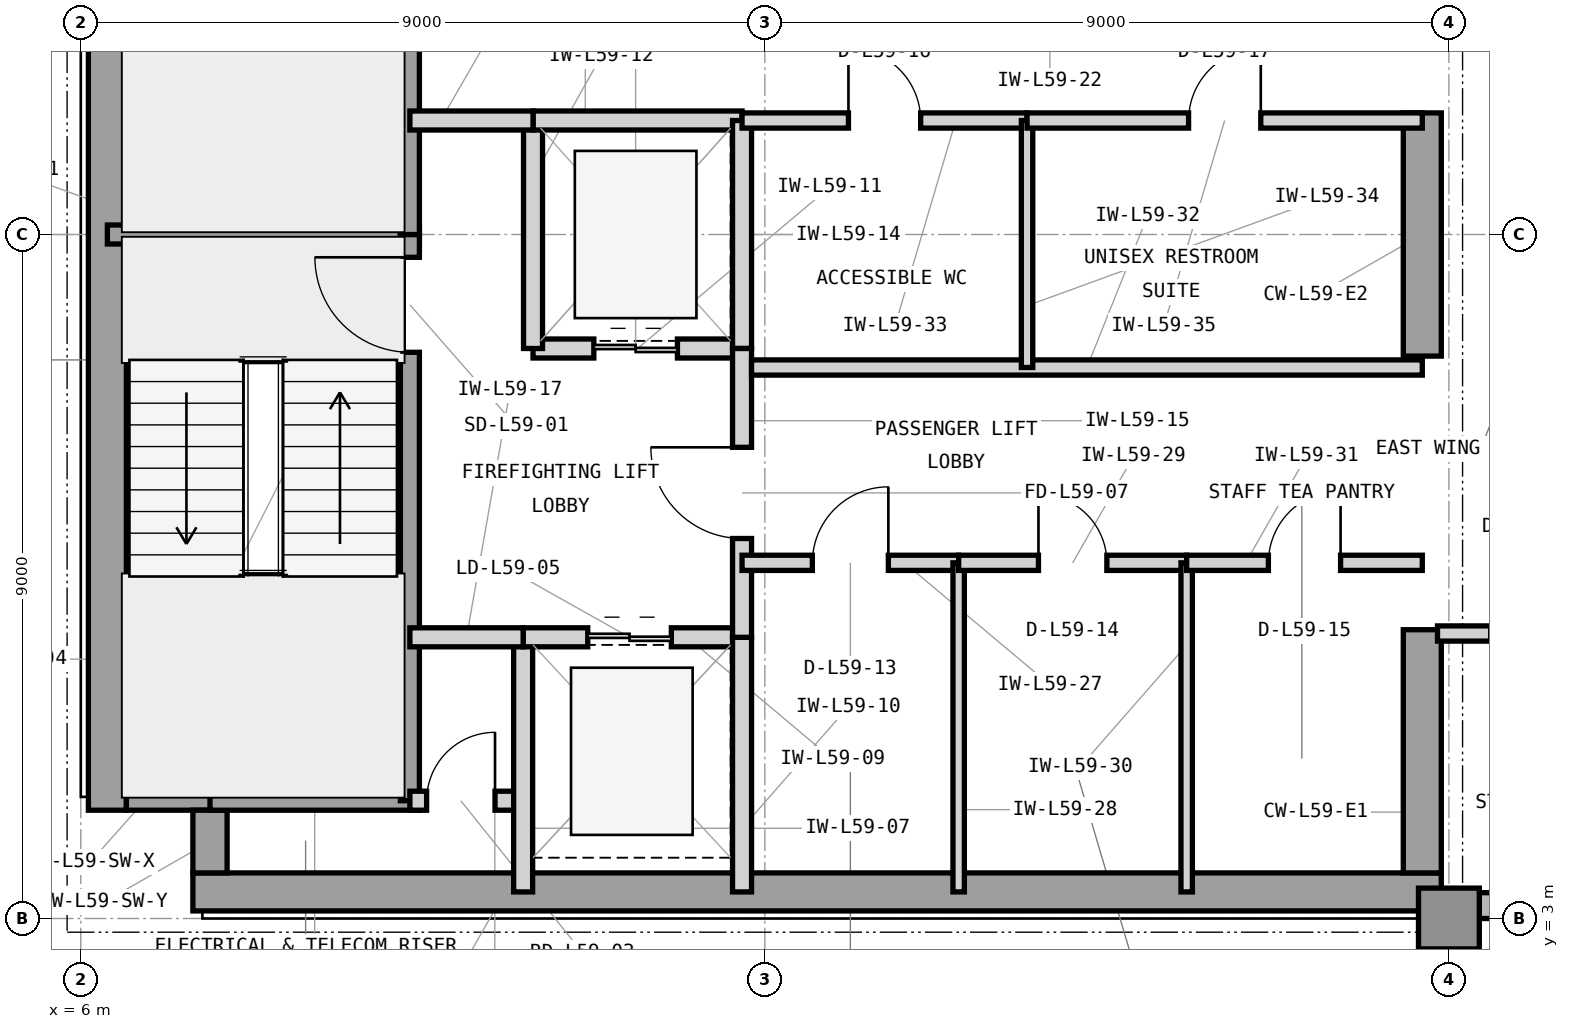
"""IFC4 building model, lengths in metres.
Left out: names, types, materials, properties, quantities, classifications, styles, units other than length and angle.
Written with IfcOpenShell. Run it as: python <this file> out.ifc"""

import sys

from ifc_helpers import new_model, si_unit, direction, frame, frame_2d, origin, origin_2d, place, context, subcontext, project, spatial, rectangle, extrude, element, fill, save


model = new_model("IFC4")
c1 = context("Model", 3, precision=1e-05, world=origin(), true_north=direction((0.0, 1.0)))
c2 = subcontext(c1, "Body", "Model", "MODEL_VIEW")
j1 = project(units=[si_unit("LENGTHUNIT", "METRE"), si_unit("PLANEANGLEUNIT", "RADIAN")], contexts=[c1])
p1 = place(None, origin())
s1 = spatial("IfcSite", under=j1, at=p1, CompositionType="ELEMENT")
p2 = place(p1, origin())
s2 = spatial("IfcBuilding", under=s1, at=p2, CompositionType="ELEMENT")
p3 = place(p2, frame((0.0, 0.0, 243.0)))
s3 = spatial("IfcBuildingStorey", under=s2, at=p3, CompositionType="ELEMENT", Elevation=243.0)
p4 = place(p3, frame((7.475, 3.35, 0.0), z_axis=(0.0, 0.0, 1.0), x_axis=(1.0, 0.0, 0.0)))
e1 = element("IfcWall", 1, at=p4, inside=s3, PredefinedType="SHEAR", context=c2, shape_type="SweptSolid", body=[
    extrude(rectangle(XDim=16.425, YDim=0.5, at=frame_2d((8.212, 0.0))), origin(), (0.0, 0.0, 1.0), 3.9),
])
p5 = place(p3, frame((6.35, 4.425, 0.0), z_axis=(0.0, 0.0, 1.0), x_axis=(0.0, 1.0, 0.0)))
e2 = element("IfcWall", 2, at=p5, inside=s3, PredefinedType="SHEAR", context=c2, shape_type="SweptSolid", body=[
    extrude(rectangle(XDim=15.15, YDim=0.5, at=frame_2d((7.575, 0.0))), origin(), (0.0, 0.0, 1.0), 3.9),
])
p6 = place(p3, frame((23.65, 3.6, 0.0), z_axis=(0.0, 0.0, 1.0), x_axis=(0.0, 1.0, 0.0)))
e3 = element("IfcWall", 3, at=p6, inside=s3, PredefinedType="SHEAR", context=c2, shape_type="SweptSolid", body=[
    extrude(rectangle(XDim=3.2, YDim=0.5, at=frame_2d((1.6, 0.0))), origin(), (0.0, 0.0, 1.0), 3.9),
])
p7 = place(p3, frame((23.65, 10.4, 0.0), z_axis=(0.0, 0.0, 1.0), x_axis=(0.0, 1.0, 0.0)))
e4 = element("IfcWall", 4, at=p7, inside=s3, PredefinedType="SHEAR", context=c2, shape_type="SweptSolid", body=[
    extrude(rectangle(XDim=3.2, YDim=0.5, at=frame_2d((1.6, 0.0))), origin(), (0.0, 0.0, 1.0), 3.9),
])
p8 = place(p3, frame((6.6, 4.65, 0.0), z_axis=(0.0, 0.0, 1.0), x_axis=(1.0, 0.0, 0.0)))
e5 = element("IfcWall", 5, at=p8, inside=s3, PredefinedType="SHEAR", context=c2, shape_type="SweptSolid", body=[
    extrude(rectangle(XDim=1.325, YDim=0.45, at=frame_2d((0.663, 0.0))), origin(), (0.0, 0.0, 1.0), 3.9),
])
p9 = place(p3, frame((7.7, 3.6, 0.0), z_axis=(0.0, 0.0, 1.0), x_axis=(0.0, 1.0, 0.0)))
e6 = element("IfcWall", 6, at=p9, inside=s3, PredefinedType="SHEAR", context=c2, shape_type="SweptSolid", body=[
    extrude(rectangle(XDim=0.825, YDim=0.45, at=frame_2d((0.413, 0.0))), origin(), (0.0, 0.0, 1.0), 3.9),
])
p10 = place(p3, frame((24.0, 3.0, 0.0), z_axis=(0.0, 0.0, 1.0), x_axis=(1.0, 0.0, 0.0)))
e7 = element("IfcColumn", 7, at=p10, inside=s3, PredefinedType="COLUMN", context=c2, shape_type="SweptSolid", body=[
    extrude(rectangle(XDim=0.8, YDim=0.8, at=origin_2d()), origin(), (0.0, 0.0, 1.0), 3.9),
])
p11 = place(p3, frame((23.9, 3.17, 0.0), z_axis=(0.0, 0.0, 1.0), x_axis=(1.0, 0.0, 0.0)))
e8 = element("IfcWall", 8, at=p11, inside=s3, PredefinedType="STANDARD", context=c2, shape_type="SweptSolid", body=[
    extrude(rectangle(XDim=28.5, YDim=0.34, at=frame_2d((14.25, 0.0))), origin(), (0.0, 0.0, 1.0), 3.7),
])
p12 = place(p11, frame((10.725, 0.0, 0.9)))
e9 = element("IfcOpeningElement", 9, at=p12, cuts=e8, PredefinedType="OPENING", context=c2, shape_type="SweptSolid", body=[
    extrude(rectangle(XDim=2.3, YDim=2.2, at=frame_2d((1.15, 1.1))), frame((0.0, 0.18, 0.0), z_axis=(0.0, -1.0, 0.0), x_axis=(1.0, 0.0, 0.0)), (0.0, 0.0, 1.0), 0.36),
])
p13 = place(p11, frame((0.85, 0.0, 0.9)))
e10 = element("IfcOpeningElement", 10, at=p13, cuts=e8, PredefinedType="OPENING", context=c2, shape_type="SweptSolid", body=[
    extrude(rectangle(XDim=1.6, YDim=2.2, at=frame_2d((0.8, 1.1))), frame((0.0, 0.18, 0.0), z_axis=(0.0, -1.0, 0.0), x_axis=(1.0, 0.0, 0.0)), (0.0, 0.0, 1.0), 0.36),
])
p14 = place(p11, frame((19.075, 0.0, 0.9)))
e11 = element("IfcOpeningElement", 11, at=p14, cuts=e8, PredefinedType="OPENING", context=c2, shape_type="SweptSolid", body=[
    extrude(rectangle(XDim=2.3, YDim=2.2, at=frame_2d((1.15, 1.1))), frame((0.0, 0.18, 0.0), z_axis=(0.0, -1.0, 0.0), x_axis=(1.0, 0.0, 0.0)), (0.0, 0.0, 1.0), 0.36),
])
p15 = place(p3, frame((6.35, 12.0, 0.0), z_axis=(0.0, 0.0, 1.0), x_axis=(1.0, 0.0, 0.0)))
e12 = element("IfcWall", 12, at=p15, inside=s3, PredefinedType="SHEAR", context=c2, shape_type="SweptSolid", body=[
    extrude(rectangle(XDim=4.105, YDim=0.25, at=frame_2d((2.052, 0.0))), origin(), (0.0, 0.0, 1.0), 3.9),
])
p16 = place(p3, frame((7.7, 4.55, 0.0), z_axis=(0.0, 0.0, 1.0), x_axis=(1.0, 0.0, 0.0)))
e13 = element("IfcWall", 13, at=p16, inside=s3, PredefinedType="SHEAR", context=c2, shape_type="SweptSolid", body=[
    extrude(rectangle(XDim=2.755, YDim=0.25, at=frame_2d((1.377, 0.0))), origin(), (0.0, 0.0, 1.0), 3.9),
])
p17 = place(p3, frame((10.33, 4.55, 0.0), z_axis=(0.0, 0.0, 1.0), x_axis=(0.0, 1.0, 0.0)))
e14 = element("IfcWall", 14, at=p17, inside=s3, PredefinedType="SHEAR", context=c2, shape_type="SweptSolid", body=[
    extrude(rectangle(XDim=7.45, YDim=0.25, at=frame_2d((3.725, 0.0))), origin(), (0.0, 0.0, 1.0), 3.9),
])
p18 = place(p17, frame((5.9, 0.0, 0.0)))
e15 = element("IfcOpeningElement", 15, at=p18, cuts=e14, PredefinedType="OPENING", context=c2, shape_type="SweptSolid", body=[
    extrude(rectangle(XDim=1.25, YDim=2.2, at=frame_2d((0.625, 1.1))), frame((0.0, 0.135, 0.0), z_axis=(0.0, -1.0, 0.0), x_axis=(1.0, 0.0, 0.0)), (0.0, 0.0, 1.0), 0.27),
])
p19 = place(p3, frame((10.33, 12.0, 0.0), z_axis=(0.0, 0.0, 1.0), x_axis=(0.0, 1.0, 0.0)))
e16 = element("IfcWall", 16, at=p19, inside=s3, PredefinedType="SHEAR", context=c2, shape_type="SweptSolid", body=[
    extrude(rectangle(XDim=7.45, YDim=0.25, at=frame_2d((3.725, 0.0))), origin(), (0.0, 0.0, 1.0), 3.9),
])
p20 = place(p19, frame((5.85, 0.0, 0.0)))
e17 = element("IfcOpeningElement", 17, at=p20, cuts=e16, PredefinedType="OPENING", context=c2, shape_type="SweptSolid", body=[
    extrude(rectangle(XDim=1.25, YDim=2.2, at=frame_2d((0.625, 1.1))), frame((0.0, 0.135, 0.0), z_axis=(0.0, -1.0, 0.0), x_axis=(1.0, 0.0, 0.0)), (0.0, 0.0, 1.0), 0.27),
])
p21 = place(p3, frame((10.33, 4.55, 0.0), z_axis=(0.0, 0.0, 1.0), x_axis=(1.0, 0.0, 0.0)))
e18 = element("IfcWall", 18, at=p21, inside=s3, PredefinedType="PARTITIONING", context=c2, shape_type="SweptSolid", body=[
    extrude(rectangle(XDim=1.49, YDim=0.25, at=frame_2d((0.745, 0.0))), origin(), (0.0, 0.0, 1.0), 3.69),
])
p22 = place(p21, frame((0.22, 0.0, 0.0)))
e19 = element("IfcOpeningElement", 19, at=p22, cuts=e18, PredefinedType="OPENING", context=c2, shape_type="SweptSolid", body=[
    extrude(rectangle(XDim=0.9, YDim=2.1, at=frame_2d((0.45, 1.05))), frame((0.0, 0.135, 0.0), z_axis=(0.0, -1.0, 0.0), x_axis=(1.0, 0.0, 0.0)), (0.0, 0.0, 1.0), 0.27),
])
p23 = place(p3, frame((11.82, 3.35, 0.0), z_axis=(0.0, 0.0, 1.0), x_axis=(0.0, 1.0, 0.0)))
e20 = element("IfcWall", 20, at=p23, inside=s3, PredefinedType="PARTITIONING", context=c2, shape_type="SweptSolid", body=[
    extrude(rectangle(XDim=3.35, YDim=0.25, at=frame_2d((1.675, 0.0))), origin(), (0.0, 0.0, 1.0), 3.69),
])
p24 = place(p3, frame((11.82, 6.7, 0.0), z_axis=(0.0, 0.0, 1.0), x_axis=(1.0, 0.0, 0.0)))
e21 = element("IfcWall", 21, at=p24, inside=s3, PredefinedType="PARTITIONING", context=c2, shape_type="SweptSolid", body=[
    extrude(rectangle(XDim=2.88, YDim=0.25, at=frame_2d((1.44, 0.0))), origin(), (0.0, 0.0, 1.0), 3.073),
])
p25 = place(p24, frame((0.85, 0.0, 0.0)))
e22 = element("IfcOpeningElement", 22, at=p25, cuts=e21, PredefinedType="OPENING", context=c2, shape_type="SweptSolid", body=[
    extrude(rectangle(XDim=1.1, YDim=2.25, at=frame_2d((0.55, 1.125))), frame((0.0, 0.135, 0.0), z_axis=(0.0, -1.0, 0.0), x_axis=(1.0, 0.0, 0.0)), (0.0, 0.0, 1.0), 0.27),
])
p26 = place(p3, frame((14.7, 3.35, 0.0), z_axis=(0.0, 0.0, 1.0), x_axis=(0.0, 1.0, 0.0)))
e23 = element("IfcWall", 23, at=p26, inside=s3, PredefinedType="PARTITIONING", context=c2, shape_type="SweptSolid", body=[
    extrude(rectangle(XDim=3.35, YDim=0.25, at=frame_2d((1.675, 0.0))), origin(), (0.0, 0.0, 1.0), 3.69),
])
p27 = place(p3, frame((11.95, 10.5, 0.0), z_axis=(0.0, 0.0, 1.0), x_axis=(1.0, 0.0, 0.0)))
e24 = element("IfcWall", 24, at=p27, inside=s3, PredefinedType="PARTITIONING", context=c2, shape_type="SweptSolid", body=[
    extrude(rectangle(XDim=2.75, YDim=0.25, at=frame_2d((1.375, 0.0))), origin(), (0.0, 0.0, 1.0), 3.073),
])
p28 = place(p27, frame((0.8, 0.0, 0.0)))
e25 = element("IfcOpeningElement", 25, at=p28, cuts=e24, PredefinedType="OPENING", context=c2, shape_type="SweptSolid", body=[
    extrude(rectangle(XDim=1.1, YDim=2.25, at=frame_2d((0.55, 1.125))), frame((0.0, 0.135, 0.0), z_axis=(0.0, -1.0, 0.0), x_axis=(1.0, 0.0, 0.0)), (0.0, 0.0, 1.0), 0.27),
])
p29 = place(p3, frame((11.95, 10.5, 0.0), z_axis=(0.0, 0.0, 1.0), x_axis=(0.0, 1.0, 0.0)))
e26 = element("IfcWall", 26, at=p29, inside=s3, PredefinedType="PARTITIONING", context=c2, shape_type="SweptSolid", body=[
    extrude(rectangle(XDim=3.0, YDim=0.25, at=frame_2d((1.5, 0.0))), origin(), (0.0, 0.0, 1.0), 3.69),
])
p30 = place(p3, frame((11.95, 13.5, 0.0), z_axis=(0.0, 0.0, 1.0), x_axis=(1.0, 0.0, 0.0)))
e27 = element("IfcWall", 27, at=p30, inside=s3, PredefinedType="PARTITIONING", context=c2, shape_type="SweptSolid", body=[
    extrude(rectangle(XDim=2.75, YDim=0.25, at=frame_2d((1.375, 0.0))), origin(), (0.0, 0.0, 1.0), 3.073),
])
p31 = place(p3, frame((14.7, 10.5, 0.0), z_axis=(0.0, 0.0, 1.0), x_axis=(0.0, 1.0, 0.0)))
e28 = element("IfcWall", 28, at=p31, inside=s3, PredefinedType="PARTITIONING", context=c2, shape_type="SweptSolid", body=[
    extrude(rectangle(XDim=3.0, YDim=0.25, at=frame_2d((1.5, 0.0))), origin(), (0.0, 0.0, 1.0), 3.69),
])
p32 = place(p3, frame((14.7, 6.7, 0.0), z_axis=(0.0, 0.0, 1.0), x_axis=(0.0, 1.0, 0.0)))
e29 = element("IfcWall", 29, at=p32, inside=s3, PredefinedType="PARTITIONING", context=c2, shape_type="SweptSolid", body=[
    extrude(rectangle(XDim=3.8, YDim=0.25, at=frame_2d((1.9, 0.0))), origin(), (0.0, 0.0, 1.0), 3.69),
])
p33 = place(p32, frame((1.3, 0.0, 0.0)))
e30 = element("IfcOpeningElement", 30, at=p33, cuts=e29, PredefinedType="OPENING", context=c2, shape_type="SweptSolid", body=[
    extrude(rectangle(XDim=1.2, YDim=2.2, at=frame_2d((0.6, 1.1))), frame((0.0, 0.135, 0.0), z_axis=(0.0, -1.0, 0.0), x_axis=(1.0, 0.0, 0.0)), (0.0, 0.0, 1.0), 0.27),
])
p34 = place(p3, frame((10.33, 13.5, 0.0), z_axis=(0.0, 0.0, 1.0), x_axis=(1.0, 0.0, 0.0)))
e31 = element("IfcWall", 31, at=p34, inside=s3, PredefinedType="PARTITIONING", context=c2, shape_type="SweptSolid", body=[
    extrude(rectangle(XDim=1.62, YDim=0.25, at=frame_2d((0.81, 0.0))), origin(), (0.0, 0.0, 1.0), 3.073),
])
p35 = place(p3, frame((10.33, 6.7, 0.0), z_axis=(0.0, 0.0, 1.0), x_axis=(1.0, 0.0, 0.0)))
e32 = element("IfcWall", 32, at=p35, inside=s3, PredefinedType="PARTITIONING", context=c2, shape_type="SweptSolid", body=[
    extrude(rectangle(XDim=1.49, YDim=0.25, at=frame_2d((0.745, 0.0))), origin(), (0.0, 0.0, 1.0), 3.073),
])
p36 = place(p3, frame((14.7, 7.68, 0.0), z_axis=(0.0, 0.0, 1.0), x_axis=(1.0, 0.0, 0.0)))
e33 = element("IfcWall", 33, at=p36, inside=s3, PredefinedType="PARTITIONING", context=c2, shape_type="SweptSolid", body=[
    extrude(rectangle(XDim=2.85, YDim=0.2, at=frame_2d((1.425, 0.0))), origin(), (0.0, 0.0, 1.0), 3.69),
])
p37 = place(p36, frame((0.925, 0.0, 0.0)))
e34 = element("IfcOpeningElement", 34, at=p37, cuts=e33, PredefinedType="OPENING", context=c2, shape_type="SweptSolid", body=[
    extrude(rectangle(XDim=1.0, YDim=2.15, at=frame_2d((0.5, 1.075))), frame((0.0, 0.11, 0.0), z_axis=(0.0, -1.0, 0.0), x_axis=(1.0, 0.0, 0.0)), (0.0, 0.0, 1.0), 0.22),
])
p38 = place(p3, frame((17.55, 3.35, 0.0), z_axis=(0.0, 0.0, 1.0), x_axis=(0.0, 1.0, 0.0)))
e35 = element("IfcWall", 35, at=p38, inside=s3, PredefinedType="PARTITIONING", context=c2, shape_type="SweptSolid", body=[
    extrude(rectangle(XDim=4.33, YDim=0.15, at=frame_2d((2.165, 0.0))), origin(), (0.0, 0.0, 1.0), 3.69),
])
p39 = place(p3, frame((17.55, 7.68, 0.0), z_axis=(0.0, 0.0, 1.0), x_axis=(1.0, 0.0, 0.0)))
e36 = element("IfcWall", 36, at=p39, inside=s3, PredefinedType="PARTITIONING", context=c2, shape_type="SweptSolid", body=[
    extrude(rectangle(XDim=3.0, YDim=0.2, at=frame_2d((1.5, 0.0))), origin(), (0.0, 0.0, 1.0), 3.69),
])
p40 = place(p39, frame((1.05, 0.0, 0.0)))
e37 = element("IfcOpeningElement", 37, at=p40, cuts=e36, PredefinedType="OPENING", context=c2, shape_type="SweptSolid", body=[
    extrude(rectangle(XDim=0.9, YDim=2.1, at=frame_2d((0.45, 1.05))), frame((0.0, 0.11, 0.0), z_axis=(0.0, -1.0, 0.0), x_axis=(1.0, 0.0, 0.0)), (0.0, 0.0, 1.0), 0.22),
])
p41 = place(p3, frame((20.55, 3.35, 0.0), z_axis=(0.0, 0.0, 1.0), x_axis=(0.0, 1.0, 0.0)))
e38 = element("IfcWall", 38, at=p41, inside=s3, PredefinedType="PARTITIONING", context=c2, shape_type="SweptSolid", body=[
    extrude(rectangle(XDim=4.33, YDim=0.15, at=frame_2d((2.165, 0.0))), origin(), (0.0, 0.0, 1.0), 3.69),
])
p42 = place(p3, frame((20.55, 7.68, 0.0), z_axis=(0.0, 0.0, 1.0), x_axis=(1.0, 0.0, 0.0)))
e39 = element("IfcWall", 39, at=p42, inside=s3, PredefinedType="PARTITIONING", context=c2, shape_type="SweptSolid", body=[
    extrude(rectangle(XDim=3.1, YDim=0.2, at=frame_2d((1.55, 0.0))), origin(), (0.0, 0.0, 1.0), 3.69),
])
p43 = place(p42, frame((1.075, 0.0, 0.0)))
e40 = element("IfcOpeningElement", 40, at=p43, cuts=e39, PredefinedType="OPENING", context=c2, shape_type="SweptSolid", body=[
    extrude(rectangle(XDim=0.95, YDim=2.1, at=frame_2d((0.475, 1.05))), frame((0.0, 0.11, 0.0), z_axis=(0.0, -1.0, 0.0), x_axis=(1.0, 0.0, 0.0)), (0.0, 0.0, 1.0), 0.22),
])
p44 = place(p3, frame((14.825, 10.25, 0.0), z_axis=(0.0, 0.0, 1.0), x_axis=(1.0, 0.0, 0.0)))
e41 = element("IfcWall", 41, at=p44, inside=s3, PredefinedType="PARTITIONING", context=c2, shape_type="SweptSolid", body=[
    extrude(rectangle(XDim=8.825, YDim=0.2, at=frame_2d((4.413, 0.0))), origin(), (0.0, 0.0, 1.0), 3.69),
])
p45 = place(p3, frame((14.7, 13.5, 0.0), z_axis=(0.0, 0.0, 1.0), x_axis=(1.0, 0.0, 0.0)))
e42 = element("IfcWall", 42, at=p45, inside=s3, PredefinedType="PARTITIONING", context=c2, shape_type="SweptSolid", body=[
    extrude(rectangle(XDim=3.75, YDim=0.2, at=frame_2d((1.875, 0.0))), origin(), (0.0, 0.0, 1.0), 3.073),
])
p46 = place(p45, frame((1.4, 0.0, 0.0)))
e43 = element("IfcOpeningElement", 43, at=p46, cuts=e42, PredefinedType="OPENING", context=c2, shape_type="SweptSolid", body=[
    extrude(rectangle(XDim=0.95, YDim=2.1, at=frame_2d((0.475, 1.05))), frame((0.0, 0.11, 0.0), z_axis=(0.0, -1.0, 0.0), x_axis=(1.0, 0.0, 0.0)), (0.0, 0.0, 1.0), 0.22),
])
p47 = place(p3, frame((18.45, 10.25, 0.0), z_axis=(0.0, 0.0, 1.0), x_axis=(0.0, 1.0, 0.0)))
e44 = element("IfcWall", 44, at=p47, inside=s3, PredefinedType="PARTITIONING", context=c2, shape_type="SweptSolid", body=[
    extrude(rectangle(XDim=3.25, YDim=0.15, at=frame_2d((1.625, 0.0))), origin(), (0.0, 0.0, 1.0), 3.69),
])
p48 = place(p3, frame((18.45, 13.5, 0.0), z_axis=(0.0, 0.0, 1.0), x_axis=(1.0, 0.0, 0.0)))
e45 = element("IfcWall", 45, at=p48, inside=s3, PredefinedType="PARTITIONING", context=c2, shape_type="SweptSolid", body=[
    extrude(rectangle(XDim=5.2, YDim=0.2, at=frame_2d((2.6, 0.0))), origin(), (0.0, 0.0, 1.0), 3.073),
])
p49 = place(p48, frame((2.125, 0.0, 0.0)))
e46 = element("IfcOpeningElement", 46, at=p49, cuts=e45, PredefinedType="OPENING", context=c2, shape_type="SweptSolid", body=[
    extrude(rectangle(XDim=0.95, YDim=2.1, at=frame_2d((0.475, 1.05))), frame((0.0, 0.11, 0.0), z_axis=(0.0, -1.0, 0.0), x_axis=(1.0, 0.0, 0.0)), (0.0, 0.0, 1.0), 0.22),
])
p50 = place(p3, frame((23.85, 6.75, 0.0), z_axis=(0.0, 0.0, 1.0), x_axis=(1.0, 0.0, 0.0)))
e47 = element("IfcWall", 47, at=p50, inside=s3, PredefinedType="PARTITIONING", context=c2, shape_type="SweptSolid", body=[
    extrude(rectangle(XDim=2.85, YDim=0.2, at=frame_2d((1.425, 0.0))), origin(), (0.0, 0.0, 1.0), 3.69),
])
p51 = place(p50, frame((0.7, 0.0, 0.0)))
e48 = element("IfcOpeningElement", 48, at=p51, cuts=e47, PredefinedType="OPENING", context=c2, shape_type="SweptSolid", body=[
    extrude(rectangle(XDim=1.0, YDim=2.15, at=frame_2d((0.5, 1.075))), frame((0.0, 0.11, 0.0), z_axis=(0.0, -1.0, 0.0), x_axis=(1.0, 0.0, 0.0)), (0.0, 0.0, 1.0), 0.22),
])
p52 = place(p18, origin())
e49 = element("IfcDoor", 49, at=p52, inside=s3, OperationType="SINGLE_SWING_RIGHT", PredefinedType="DOOR", context=c2, shape_type="SweptSolid", body=[
    extrude(rectangle(XDim=1.25, YDim=2.2, at=frame_2d((0.625, 1.1))), frame((0.0, 0.025, 0.0), z_axis=(0.0, -1.0, 0.0), x_axis=(1.0, 0.0, 0.0)), (0.0, 0.0, 1.0), 0.05),
])
fill(e15, e49)
p53 = place(p22, origin())
e50 = element("IfcDoor", 50, at=p53, inside=s3, OperationType="SINGLE_SWING_RIGHT", PredefinedType="TRAPDOOR", context=c2, shape_type="SweptSolid", body=[
    extrude(rectangle(XDim=0.9, YDim=2.1, at=frame_2d((0.45, 1.05))), frame((0.0, 0.025, 0.0), z_axis=(0.0, -1.0, 0.0), x_axis=(1.0, 0.0, 0.0)), (0.0, 0.0, 1.0), 0.05),
])
fill(e19, e50)
p54 = place(p25, origin())
e51 = element("IfcDoor", 51, at=p54, inside=s3, OperationType="DOUBLE_DOOR_SLIDING", PredefinedType="DOOR", context=c2, shape_type="SweptSolid", body=[
    extrude(rectangle(XDim=1.1, YDim=2.25, at=frame_2d((0.55, 1.125))), frame((0.0, 0.025, 0.0), z_axis=(0.0, -1.0, 0.0), x_axis=(1.0, 0.0, 0.0)), (0.0, 0.0, 1.0), 0.05),
])
fill(e22, e51)
p55 = place(p28, origin())
e52 = element("IfcDoor", 52, at=p55, inside=s3, OperationType="DOUBLE_DOOR_SLIDING", PredefinedType="DOOR", context=c2, shape_type="SweptSolid", body=[
    extrude(rectangle(XDim=1.1, YDim=2.25, at=frame_2d((0.55, 1.125))), frame((0.0, 0.025, 0.0), z_axis=(0.0, -1.0, 0.0), x_axis=(1.0, 0.0, 0.0)), (0.0, 0.0, 1.0), 0.05),
])
fill(e25, e52)
p56 = place(p33, origin())
e53 = element("IfcDoor", 53, at=p56, inside=s3, OperationType="SINGLE_SWING_RIGHT", PredefinedType="DOOR", context=c2, shape_type="SweptSolid", body=[
    extrude(rectangle(XDim=1.2, YDim=2.2, at=frame_2d((0.6, 1.1))), frame((0.0, 0.025, 0.0), z_axis=(0.0, -1.0, 0.0), x_axis=(1.0, 0.0, 0.0)), (0.0, 0.0, 1.0), 0.05),
])
fill(e30, e53)
p57 = place(p37, origin())
e54 = element("IfcDoor", 54, at=p57, inside=s3, OperationType="SINGLE_SWING_RIGHT", PredefinedType="DOOR", context=c2, shape_type="SweptSolid", body=[
    extrude(rectangle(XDim=1.0, YDim=2.15, at=frame_2d((0.5, 1.075))), frame((0.0, 0.025, 0.0), z_axis=(0.0, -1.0, 0.0), x_axis=(1.0, 0.0, 0.0)), (0.0, 0.0, 1.0), 0.05),
])
fill(e34, e54)
p58 = place(p40, origin())
e55 = element("IfcDoor", 55, at=p58, inside=s3, OperationType="SINGLE_SWING_LEFT", PredefinedType="TRAPDOOR", context=c2, shape_type="SweptSolid", body=[
    extrude(rectangle(XDim=0.9, YDim=2.1, at=frame_2d((0.45, 1.05))), frame((0.0, 0.025, 0.0), z_axis=(0.0, -1.0, 0.0), x_axis=(1.0, 0.0, 0.0)), (0.0, 0.0, 1.0), 0.05),
])
fill(e37, e55)
p59 = place(p43, origin())
e56 = element("IfcDoor", 56, at=p59, inside=s3, OperationType="SINGLE_SWING_RIGHT", PredefinedType="DOOR", context=c2, shape_type="SweptSolid", body=[
    extrude(rectangle(XDim=0.95, YDim=2.1, at=frame_2d((0.475, 1.05))), frame((0.0, 0.025, 0.0), z_axis=(0.0, -1.0, 0.0), x_axis=(1.0, 0.0, 0.0)), (0.0, 0.0, 1.0), 0.05),
])
fill(e40, e56)
p60 = place(p46, origin())
e57 = element("IfcDoor", 57, at=p60, inside=s3, OperationType="SINGLE_SWING_LEFT", PredefinedType="DOOR", context=c2, shape_type="SweptSolid", body=[
    extrude(rectangle(XDim=0.95, YDim=2.1, at=frame_2d((0.475, 1.05))), frame((0.0, 0.025, 0.0), z_axis=(0.0, -1.0, 0.0), x_axis=(1.0, 0.0, 0.0)), (0.0, 0.0, 1.0), 0.05),
])
fill(e43, e57)
p61 = place(p49, origin())
e58 = element("IfcDoor", 58, at=p61, inside=s3, OperationType="SINGLE_SWING_RIGHT", PredefinedType="DOOR", context=c2, shape_type="SweptSolid", body=[
    extrude(rectangle(XDim=0.95, YDim=2.1, at=frame_2d((0.475, 1.05))), frame((0.0, 0.025, 0.0), z_axis=(0.0, -1.0, 0.0), x_axis=(1.0, 0.0, 0.0)), (0.0, 0.0, 1.0), 0.05),
])
fill(e46, e58)
save(model, sys.argv[1])
